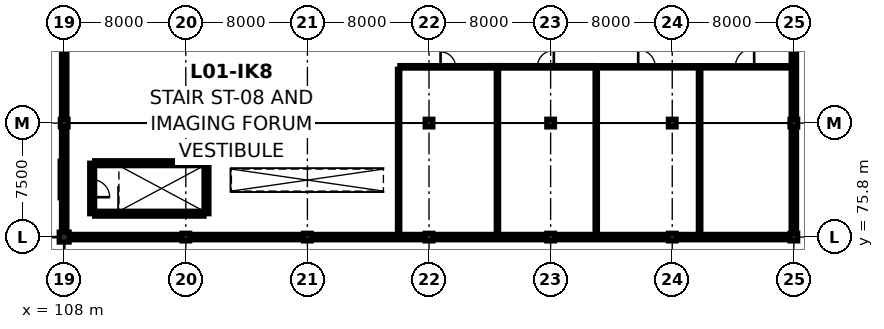
"""IFC4 building model, lengths in metres.
Left out: names, types, materials, properties, quantities, classifications, styles, units other than length and angle.
Written with IfcOpenShell. Run it as: python <this file> out.ifc"""

import sys

from ifc_helpers import new_model, si_unit, direction, frame, frame_2d, origin, origin_2d, place, context, subcontext, project, spatial, rectangle, circle, extrude, element, fill, save


model = new_model("IFC4")
c1 = context("Model", 3, precision=1e-05, world=origin(), true_north=direction((0.0, 1.0)))
c2 = subcontext(c1, "Body", "Model", "MODEL_VIEW")
j1 = project(units=[si_unit("LENGTHUNIT", "METRE"), si_unit("PLANEANGLEUNIT", "RADIAN")], contexts=[c1])
p1 = place(None, origin())
s1 = spatial("IfcSite", under=j1, at=p1, CompositionType="ELEMENT")
p2 = place(p1, origin())
s2 = spatial("IfcBuilding", under=s1, at=p2, CompositionType="ELEMENT")
p3 = place(p2, frame((0.0, 0.0, 5.0)))
s3 = spatial("IfcBuildingStorey", under=s2, at=p3, CompositionType="ELEMENT", Elevation=5.0)
p4 = place(p3, frame((108.0, 75.8, 0.0), z_axis=(0.0, 0.0, 1.0), x_axis=(1.0, 0.0, 0.0)))
e1 = element("IfcColumn", 1, at=p4, inside=s3, PredefinedType="COLUMN", context=c2, shape_type="SweptSolid", body=[
    extrude(circle(Radius=0.325, at=origin_2d()), origin(), (0.0, 0.0, 1.0), 4.2),
])
p5 = place(p3, frame((108.0, 83.3, 0.0), z_axis=(0.0, 0.0, 1.0), x_axis=(1.0, 0.0, 0.0)))
e2 = element("IfcColumn", 2, at=p5, inside=s3, PredefinedType="COLUMN", context=c2, shape_type="SweptSolid", body=[
    extrude(rectangle(XDim=0.5, YDim=0.5, at=origin_2d()), origin(), (0.0, 0.0, 1.0), 5.5),
])
p6 = place(p3, frame((116.0, 75.8, 0.0), z_axis=(0.0, 0.0, 1.0), x_axis=(1.0, 0.0, 0.0)))
e3 = element("IfcColumn", 3, at=p6, inside=s3, PredefinedType="COLUMN", context=c2, shape_type="SweptSolid", body=[
    extrude(rectangle(XDim=0.5, YDim=0.5, at=origin_2d()), origin(), (0.0, 0.0, 1.0), 4.356),
])
p7 = place(p3, frame((116.0, 83.3, 0.0), z_axis=(0.0, 0.0, 1.0), x_axis=(1.0, 0.0, 0.0)))
e4 = element("IfcColumn", 4, at=p7, inside=s3, PredefinedType="COLUMN", context=c2, shape_type="SweptSolid", body=[
    extrude(rectangle(XDim=0.5, YDim=0.5, at=origin_2d()), origin(), (0.0, 0.0, 1.0), 5.5),
])
p8 = place(p3, frame((124.0, 75.8, 0.0), z_axis=(0.0, 0.0, 1.0), x_axis=(1.0, 0.0, 0.0)))
e5 = element("IfcColumn", 5, at=p8, inside=s3, PredefinedType="COLUMN", context=c2, shape_type="SweptSolid", body=[
    extrude(rectangle(XDim=0.5, YDim=0.5, at=origin_2d()), origin(), (0.0, 0.0, 1.0), 4.356),
])
p9 = place(p3, frame((124.0, 83.3, 0.0), z_axis=(0.0, 0.0, 1.0), x_axis=(1.0, 0.0, 0.0)))
e6 = element("IfcColumn", 6, at=p9, inside=s3, PredefinedType="COLUMN", context=c2, shape_type="SweptSolid", body=[
    extrude(rectangle(XDim=0.5, YDim=0.5, at=origin_2d()), origin(), (0.0, 0.0, 1.0), 5.5),
])
p10 = place(p3, frame((132.0, 75.8, 0.0), z_axis=(0.0, 0.0, 1.0), x_axis=(1.0, 0.0, 0.0)))
e7 = element("IfcColumn", 7, at=p10, inside=s3, PredefinedType="COLUMN", context=c2, shape_type="SweptSolid", body=[
    extrude(rectangle(XDim=0.5, YDim=0.5, at=origin_2d()), origin(), (0.0, 0.0, 1.0), 4.356),
])
p11 = place(p3, frame((132.0, 83.3, 0.0), z_axis=(0.0, 0.0, 1.0), x_axis=(1.0, 0.0, 0.0)))
e8 = element("IfcColumn", 8, at=p11, inside=s3, PredefinedType="COLUMN", context=c2, shape_type="SweptSolid", body=[
    extrude(rectangle(XDim=0.5, YDim=0.5, at=origin_2d()), origin(), (0.0, 0.0, 1.0), 5.5),
])
p12 = place(p3, frame((140.0, 75.8, 0.0), z_axis=(0.0, 0.0, 1.0), x_axis=(1.0, 0.0, 0.0)))
e9 = element("IfcColumn", 9, at=p12, inside=s3, PredefinedType="COLUMN", context=c2, shape_type="SweptSolid", body=[
    extrude(rectangle(XDim=0.5, YDim=0.5, at=origin_2d()), origin(), (0.0, 0.0, 1.0), 4.356),
])
p13 = place(p3, frame((140.0, 83.3, 0.0), z_axis=(0.0, 0.0, 1.0), x_axis=(1.0, 0.0, 0.0)))
e10 = element("IfcColumn", 10, at=p13, inside=s3, PredefinedType="COLUMN", context=c2, shape_type="SweptSolid", body=[
    extrude(rectangle(XDim=0.5, YDim=0.5, at=origin_2d()), origin(), (0.0, 0.0, 1.0), 5.5),
])
p14 = place(p3, frame((148.0, 75.8, 0.0), z_axis=(0.0, 0.0, 1.0), x_axis=(1.0, 0.0, 0.0)))
e11 = element("IfcColumn", 11, at=p14, inside=s3, PredefinedType="COLUMN", context=c2, shape_type="SweptSolid", body=[
    extrude(rectangle(XDim=0.5, YDim=0.5, at=origin_2d()), origin(), (0.0, 0.0, 1.0), 4.356),
])
p15 = place(p3, frame((148.0, 83.3, 0.0), z_axis=(0.0, 0.0, 1.0), x_axis=(1.0, 0.0, 0.0)))
e12 = element("IfcColumn", 12, at=p15, inside=s3, PredefinedType="COLUMN", context=c2, shape_type="SweptSolid", body=[
    extrude(rectangle(XDim=0.5, YDim=0.5, at=origin_2d()), origin(), (0.0, 0.0, 1.0), 5.5),
])
p16 = place(p3, frame((156.0, 75.8, 0.0), z_axis=(0.0, 0.0, 1.0), x_axis=(1.0, 0.0, 0.0)))
e13 = element("IfcColumn", 13, at=p16, inside=s3, PredefinedType="COLUMN", context=c2, shape_type="SweptSolid", body=[
    extrude(rectangle(XDim=0.5, YDim=0.5, at=origin_2d()), origin(), (0.0, 0.0, 1.0), 4.356),
])
p17 = place(p3, frame((156.0, 83.3, 0.0), z_axis=(0.0, 0.0, 1.0), x_axis=(1.0, 0.0, 0.0)))
e14 = element("IfcColumn", 14, at=p17, inside=s3, PredefinedType="COLUMN", context=c2, shape_type="SweptSolid", body=[
    extrude(rectangle(XDim=0.5, YDim=0.5, at=origin_2d()), origin(), (0.0, 0.0, 1.0), 5.5),
])
p18 = place(p3, frame((108.0, 76.125, 0.0), z_axis=(0.0, 0.0, 1.0), x_axis=(0.0, 1.0, 0.0)))
e15 = element("IfcWall", 15, at=p18, inside=s3, PredefinedType="SOLIDWALL", context=c2, shape_type="SweptSolid", body=[
    extrude(rectangle(XDim=6.925, YDim=0.35, at=frame_2d((3.462, 0.0))), origin(), (0.0, 0.0, 1.0), 3.535),
])
p19 = place(p18, frame((2.663, 0.0, 0.9)))
e16 = element("IfcOpeningElement", 16, at=p19, cuts=e15, PredefinedType="OPENING", context=c2, shape_type="SweptSolid", body=[
    extrude(rectangle(XDim=1.6, YDim=1.9, at=frame_2d((0.8, 0.95))), frame((0.0, 0.187, 0.0), z_axis=(0.0, -1.0, 0.0), x_axis=(1.0, 0.0, 0.0)), (0.0, 0.0, 1.0), 0.374),
])
for number, where, z_axis, x_axis in (
    (17, (108.0, 83.55, 0.0), (0.0, 0.0, 1.0), (0.0, 1.0, 0.0)),
    (18, (156.0, 90.55, 0.0), (0.0, 0.0, 1.0), (0.0, -1.0, 0.0)),
):
    element("IfcWall", number, at=place(p3, frame(where, z_axis=z_axis, x_axis=x_axis)), inside=s3, PredefinedType="SOLIDWALL", context=c2, shape_type="SweptSolid", body=[
        extrude(rectangle(XDim=7.0, YDim=0.35, at=frame_2d((3.5, 0.0))), origin(), (0.0, 0.0, 1.0), 4.2),
    ])
p20 = place(p3, frame((156.0, 83.05, 0.0), z_axis=(0.0, 0.0, 1.0), x_axis=(0.0, -1.0, 0.0)))
e19 = element("IfcWall", 19, at=p20, inside=s3, PredefinedType="SOLIDWALL", context=c2, shape_type="SweptSolid", body=[
    extrude(rectangle(XDim=7.0, YDim=0.35, at=frame_2d((3.5, 0.0))), origin(), (0.0, 0.0, 1.0), 4.2),
])
p21 = place(p20, frame((2.4, 0.0, 0.9)))
e20 = element("IfcOpeningElement", 20, at=p21, cuts=e19, PredefinedType="OPENING", context=c2, shape_type="SweptSolid", body=[
    extrude(rectangle(XDim=2.2, YDim=1.3, at=frame_2d((1.1, 0.65))), frame((0.0, 0.187, 0.0), z_axis=(0.0, -1.0, 0.0), x_axis=(1.0, 0.0, 0.0)), (0.0, 0.0, 1.0), 0.374),
])
p22 = place(p3, frame((155.75, 75.8, 0.0), z_axis=(0.0, 0.0, 1.0), x_axis=(-1.0, 0.0, 0.0)))
e21 = element("IfcWall", 21, at=p22, inside=s3, PredefinedType="SOLIDWALL", context=c2, shape_type="SweptSolid", body=[
    extrude(rectangle(XDim=7.5, YDim=0.35, at=frame_2d((3.75, 0.0))), origin(), (0.0, 0.0, 1.0), 4.2),
])
for number, where, z_axis, x_axis in (
    (22, (147.75, 75.8, 0.0), (0.0, 0.0, 1.0), (-1.0, 0.0, 0.0)),
    (23, (139.75, 75.8, 0.0), (0.0, 0.0, 1.0), (-1.0, 0.0, 0.0)),
    (24, (131.75, 75.8, 0.0), (0.0, 0.0, 1.0), (-1.0, 0.0, 0.0)),
):
    element("IfcWall", number, at=place(p3, frame(where, z_axis=z_axis, x_axis=x_axis)), inside=s3, PredefinedType="SOLIDWALL", context=c2, shape_type="SweptSolid", body=[
        extrude(rectangle(XDim=7.5, YDim=0.35, at=frame_2d((3.75, 0.0))), origin(), (0.0, 0.0, 1.0), 3.655),
    ])
p23 = place(p3, frame((123.75, 75.8, 0.0), z_axis=(0.0, 0.0, 1.0), x_axis=(-1.0, 0.0, 0.0)))
e25 = element("IfcWall", 25, at=p23, inside=s3, PredefinedType="SOLIDWALL", context=c2, shape_type="SweptSolid", body=[
    extrude(rectangle(XDim=7.5, YDim=0.35, at=frame_2d((3.75, 0.0))), origin(), (0.0, 0.0, 1.0), 3.655),
])
p24 = place(p23, frame((2.65, 0.0, 0.9)))
e26 = element("IfcOpeningElement", 26, at=p24, cuts=e25, PredefinedType="OPENING", context=c2, shape_type="SweptSolid", body=[
    extrude(rectangle(XDim=2.2, YDim=1.5, at=frame_2d((1.1, 0.75))), frame((0.0, 0.187, 0.0), z_axis=(0.0, -1.0, 0.0), x_axis=(1.0, 0.0, 0.0)), (0.0, 0.0, 1.0), 0.374),
])
p25 = place(p3, frame((115.75, 75.8, 0.0), z_axis=(0.0, 0.0, 1.0), x_axis=(-1.0, 0.0, 0.0)))
e27 = element("IfcWall", 27, at=p25, inside=s3, PredefinedType="SOLIDWALL", context=c2, shape_type="SweptSolid", body=[
    extrude(rectangle(XDim=7.425, YDim=0.35, at=frame_2d((3.712, 0.0))), origin(), (0.0, 0.0, 1.0), 3.535),
])
p26 = place(p25, frame((2.613, 0.0, 0.9)))
e28 = element("IfcOpeningElement", 28, at=p26, cuts=e27, PredefinedType="OPENING", context=c2, shape_type="SweptSolid", body=[
    extrude(rectangle(XDim=2.2, YDim=1.7, at=frame_2d((1.1, 0.85))), frame((0.0, 0.187, 0.0), z_axis=(0.0, -1.0, 0.0), x_axis=(1.0, 0.0, 0.0)), (0.0, 0.0, 1.0), 0.374),
])
p27 = place(p3, frame((110.005, 77.34, 0.0), z_axis=(0.0, 0.0, 1.0), x_axis=(1.0, 0.0, 0.0)))
e29 = element("IfcWall", 29, at=p27, inside=s3, PredefinedType="SHEAR", context=c2, shape_type="SweptSolid", body=[
    extrude(rectangle(XDim=7.19, YDim=0.32, at=frame_2d((3.595, 0.0))), origin(), (0.0, 0.0, 1.0), 4.2),
])
p28 = place(p3, frame((117.36, 77.34, 0.0), z_axis=(0.0, 0.0, 1.0), x_axis=(0.0, 1.0, 0.0)))
e30 = element("IfcWall", 30, at=p28, inside=s3, PredefinedType="SHEAR", context=c2, shape_type="SweptSolid", body=[
    extrude(rectangle(XDim=3.32, YDim=0.32, at=frame_2d((1.66, 0.0))), origin(), (0.0, 0.0, 1.0), 4.2),
])
p29 = place(p3, frame((117.195, 80.66, 0.0), z_axis=(0.0, 0.0, 1.0), x_axis=(-1.0, 0.0, 0.0)))
e31 = element("IfcWall", 31, at=p29, inside=s3, PredefinedType="SHEAR", context=c2, shape_type="SweptSolid", body=[
    extrude(rectangle(XDim=7.19, YDim=0.32, at=frame_2d((3.595, 0.0))), origin(), (0.0, 0.0, 1.0), 4.2),
])
p30 = place(p3, frame((109.84, 80.66, 0.0), z_axis=(0.0, 0.0, 1.0), x_axis=(0.0, -1.0, 0.0)))
e32 = element("IfcWall", 32, at=p30, inside=s3, PredefinedType="SHEAR", context=c2, shape_type="SweptSolid", body=[
    extrude(rectangle(XDim=3.32, YDim=0.32, at=frame_2d((1.66, 0.0))), origin(), (0.0, 0.0, 1.0), 4.2),
])
p31 = place(p30, frame((1.085, 0.0, 0.0)))
e33 = element("IfcOpeningElement", 33, at=p31, cuts=e32, PredefinedType="OPENING", context=c2, shape_type="SweptSolid", body=[
    extrude(rectangle(XDim=1.15, YDim=2.15, at=frame_2d((0.575, 1.075))), frame((0.0, 0.172, 0.0), z_axis=(0.0, -1.0, 0.0), x_axis=(1.0, 0.0, 0.0)), (0.0, 0.0, 1.0), 0.344),
])
p32 = place(p3, frame((130.085, 87.0, 0.0), z_axis=(0.0, 0.0, 1.0), x_axis=(1.0, 0.0, 0.0)))
e34 = element("IfcWall", 34, at=p32, inside=s3, PredefinedType="PARTITIONING", context=c2, shape_type="SweptSolid", body=[
    extrude(rectangle(XDim=6.33, YDim=0.16, at=frame_2d((3.165, 0.0))), origin(), (0.0, 0.0, 1.0), 4.175),
])
p33 = place(p32, frame((2.675, 0.0, 0.0)))
e35 = element("IfcOpeningElement", 35, at=p33, cuts=e34, PredefinedType="OPENING", context=c2, shape_type="SweptSolid", body=[
    extrude(rectangle(XDim=0.98, YDim=2.12, at=frame_2d((0.49, 1.06))), frame((0.0, 0.092, 0.0), z_axis=(0.0, -1.0, 0.0), x_axis=(1.0, 0.0, 0.0)), (0.0, 0.0, 1.0), 0.184),
])
p34 = place(p3, frame((136.427, 87.0, 0.0), z_axis=(0.0, 0.0, 1.0), x_axis=(1.0, 0.0, 0.0)))
e36 = element("IfcWall", 36, at=p34, inside=s3, PredefinedType="PARTITIONING", context=c2, shape_type="SweptSolid", body=[
    extrude(rectangle(XDim=6.488, YDim=0.16, at=frame_2d((3.244, 0.0))), origin(), (0.0, 0.0, 1.0), 4.175),
])
p35 = place(p34, frame((2.704, 0.0, 0.0)))
e37 = element("IfcOpeningElement", 37, at=p35, cuts=e36, PredefinedType="OPENING", context=c2, shape_type="SweptSolid", body=[
    extrude(rectangle(XDim=1.08, YDim=2.18, at=frame_2d((0.54, 1.09))), frame((0.0, 0.092, 0.0), z_axis=(0.0, -1.0, 0.0), x_axis=(1.0, 0.0, 0.0)), (0.0, 0.0, 1.0), 0.184),
])
p36 = place(p3, frame((142.927, 87.0, 0.0), z_axis=(0.0, 0.0, 1.0), x_axis=(1.0, 0.0, 0.0)))
e38 = element("IfcWall", 38, at=p36, inside=s3, PredefinedType="PARTITIONING", context=c2, shape_type="SweptSolid", body=[
    extrude(rectangle(XDim=6.788, YDim=0.15, at=frame_2d((3.394, 0.0))), origin(), (0.0, 0.0, 1.0), 4.2),
])
p37 = place(p36, frame((2.834, 0.0, 0.0)))
e39 = element("IfcOpeningElement", 39, at=p37, cuts=e38, PredefinedType="OPENING", context=c2, shape_type="SweptSolid", body=[
    extrude(rectangle(XDim=1.12, YDim=2.2, at=frame_2d((0.56, 1.1))), frame((0.0, 0.087, 0.0), z_axis=(0.0, -1.0, 0.0), x_axis=(1.0, 0.0, 0.0)), (0.0, 0.0, 1.0), 0.174),
])
p38 = place(p3, frame((149.727, 87.0, 0.0), z_axis=(0.0, 0.0, 1.0), x_axis=(1.0, 0.0, 0.0)))
e40 = element("IfcWall", 40, at=p38, inside=s3, PredefinedType="PARTITIONING", context=c2, shape_type="SweptSolid", body=[
    extrude(rectangle(XDim=6.086, YDim=0.15, at=frame_2d((3.043, 0.0))), origin(), (0.0, 0.0, 1.0), 4.2),
])
p39 = place(p38, frame((2.423, 0.0, 0.0)))
e41 = element("IfcOpeningElement", 41, at=p39, cuts=e40, PredefinedType="OPENING", context=c2, shape_type="SweptSolid", body=[
    extrude(rectangle(XDim=1.24, YDim=2.2, at=frame_2d((0.62, 1.1))), frame((0.0, 0.087, 0.0), z_axis=(0.0, -1.0, 0.0), x_axis=(1.0, 0.0, 0.0)), (0.0, 0.0, 1.0), 0.174),
])
p40 = place(p3, frame((130.0, 75.987, 0.0), z_axis=(0.0, 0.0, 1.0), x_axis=(0.0, 1.0, 0.0)))
e42 = element("IfcWall", 42, at=p40, inside=s3, PredefinedType="PARTITIONING", context=c2, shape_type="SweptSolid", body=[
    extrude(rectangle(XDim=10.848, YDim=0.15, at=frame_2d((5.424, 0.0))), origin(), (0.0, 0.0, 1.0), 4.2),
])
p41 = place(p3, frame((136.5, 75.987, 0.0), z_axis=(0.0, 0.0, 1.0), x_axis=(0.0, 1.0, 0.0)))
e43 = element("IfcWall", 43, at=p41, inside=s3, PredefinedType="PARTITIONING", context=c2, shape_type="SweptSolid", body=[
    extrude(rectangle(XDim=10.921, YDim=0.15, at=frame_2d((5.46, 0.0))), origin(), (0.0, 0.0, 1.0), 4.2),
])
p42 = place(p3, frame((143.0, 75.987, 0.0), z_axis=(0.0, 0.0, 1.0), x_axis=(0.0, 1.0, 0.0)))
e44 = element("IfcWall", 44, at=p42, inside=s3, PredefinedType="PARTITIONING", context=c2, shape_type="SweptSolid", body=[
    extrude(rectangle(XDim=10.926, YDim=0.15, at=frame_2d((5.463, 0.0))), origin(), (0.0, 0.0, 1.0), 4.2),
])
p43 = place(p3, frame((149.8, 75.987, 0.0), z_axis=(0.0, 0.0, 1.0), x_axis=(0.0, 1.0, 0.0)))
e45 = element("IfcWall", 45, at=p43, inside=s3, PredefinedType="PARTITIONING", context=c2, shape_type="SweptSolid", body=[
    extrude(rectangle(XDim=10.926, YDim=0.16, at=frame_2d((5.463, 0.0))), origin(), (0.0, 0.0, 1.0), 4.2),
])
p44 = place(p19, origin())
e46 = element("IfcWindow", 46, at=p44, inside=s3, PartitioningType="DOUBLE_PANEL_VERTICAL", PredefinedType="WINDOW", context=c2, shape_type="SweptSolid", body=[
    extrude(rectangle(XDim=1.6, YDim=1.9, at=frame_2d((0.8, 0.95))), frame((0.0, 0.03, 0.0), z_axis=(0.0, -1.0, 0.0), x_axis=(1.0, 0.0, 0.0)), (0.0, 0.0, 1.0), 0.06),
])
fill(e16, e46)
p45 = place(p21, origin())
e47 = element("IfcWindow", 47, at=p45, inside=s3, PartitioningType="DOUBLE_PANEL_VERTICAL", PredefinedType="WINDOW", context=c2, shape_type="SweptSolid", body=[
    extrude(rectangle(XDim=2.2, YDim=1.3, at=frame_2d((1.1, 0.65))), frame((0.0, 0.03, 0.0), z_axis=(0.0, -1.0, 0.0), x_axis=(1.0, 0.0, 0.0)), (0.0, 0.0, 1.0), 0.06),
])
fill(e20, e47)
p46 = place(p24, origin())
e48 = element("IfcWindow", 48, at=p46, inside=s3, PartitioningType="DOUBLE_PANEL_VERTICAL", PredefinedType="WINDOW", context=c2, shape_type="SweptSolid", body=[
    extrude(rectangle(XDim=2.2, YDim=1.5, at=frame_2d((1.1, 0.75))), frame((0.0, 0.03, 0.0), z_axis=(0.0, -1.0, 0.0), x_axis=(1.0, 0.0, 0.0)), (0.0, 0.0, 1.0), 0.06),
])
fill(e26, e48)
p47 = place(p26, origin())
e49 = element("IfcWindow", 49, at=p47, inside=s3, PartitioningType="DOUBLE_PANEL_VERTICAL", PredefinedType="WINDOW", context=c2, shape_type="SweptSolid", body=[
    extrude(rectangle(XDim=2.2, YDim=1.7, at=frame_2d((1.1, 0.85))), frame((0.0, 0.03, 0.0), z_axis=(0.0, -1.0, 0.0), x_axis=(1.0, 0.0, 0.0)), (0.0, 0.0, 1.0), 0.06),
])
fill(e28, e49)
p48 = place(p31, origin())
e50 = element("IfcDoor", 50, at=p48, inside=s3, OperationType="SINGLE_SWING_RIGHT", PredefinedType="DOOR", context=c2, shape_type="SweptSolid", body=[
    extrude(rectangle(XDim=1.15, YDim=2.15, at=frame_2d((0.575, 1.075))), frame((0.0, 0.025, 0.0), z_axis=(0.0, -1.0, 0.0), x_axis=(1.0, 0.0, 0.0)), (0.0, 0.0, 1.0), 0.05),
])
fill(e33, e50)
p49 = place(p33, origin())
e51 = element("IfcDoor", 51, at=p49, inside=s3, OperationType="SINGLE_SWING_LEFT", PredefinedType="DOOR", context=c2, shape_type="SweptSolid", body=[
    extrude(rectangle(XDim=0.98, YDim=2.12, at=frame_2d((0.49, 1.06))), frame((0.0, 0.025, 0.0), z_axis=(0.0, -1.0, 0.0), x_axis=(1.0, 0.0, 0.0)), (0.0, 0.0, 1.0), 0.05),
])
fill(e35, e51)
p50 = place(p35, origin())
e52 = element("IfcDoor", 52, at=p50, inside=s3, OperationType="SINGLE_SWING_RIGHT", PredefinedType="DOOR", context=c2, shape_type="SweptSolid", body=[
    extrude(rectangle(XDim=1.08, YDim=2.18, at=frame_2d((0.54, 1.09))), frame((0.0, 0.025, 0.0), z_axis=(0.0, -1.0, 0.0), x_axis=(1.0, 0.0, 0.0)), (0.0, 0.0, 1.0), 0.05),
])
fill(e37, e52)
p51 = place(p37, origin())
e53 = element("IfcDoor", 53, at=p51, inside=s3, OperationType="SINGLE_SWING_LEFT", PredefinedType="DOOR", context=c2, shape_type="SweptSolid", body=[
    extrude(rectangle(XDim=1.12, YDim=2.2, at=frame_2d((0.56, 1.1))), frame((0.0, 0.025, 0.0), z_axis=(0.0, -1.0, 0.0), x_axis=(1.0, 0.0, 0.0)), (0.0, 0.0, 1.0), 0.05),
])
fill(e39, e53)
p52 = place(p39, origin())
e54 = element("IfcDoor", 54, at=p52, inside=s3, OperationType="SINGLE_SWING_RIGHT", PredefinedType="DOOR", context=c2, shape_type="SweptSolid", body=[
    extrude(rectangle(XDim=1.24, YDim=2.2, at=frame_2d((0.62, 1.1))), frame((0.0, 0.025, 0.0), z_axis=(0.0, -1.0, 0.0), x_axis=(1.0, 0.0, 0.0)), (0.0, 0.0, 1.0), 0.05),
])
fill(e41, e54)
save(model, sys.argv[1])
